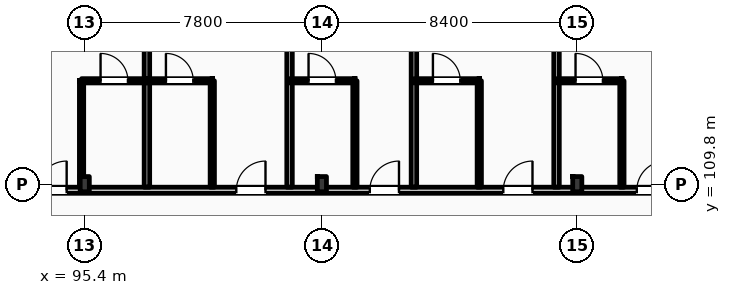
"""IFC4 building model, lengths in metres.
Left out: names, types, materials, properties, quantities, classifications, styles, units other than length and angle.
Written with IfcOpenShell. Run it as: python <this file> out.ifc"""

import sys

from ifc_helpers import new_model, si_unit, direction, frame, frame_2d, origin, origin_2d, place, context, subcontext, project, spatial, rectangle, i_section, extrude, element, fill, save


model = new_model("IFC4")
c1 = context("Model", 3, precision=1e-05, world=origin(), true_north=direction((0.0, 1.0)))
c2 = subcontext(c1, "Body", "Model", "MODEL_VIEW")
j1 = project(units=[si_unit("LENGTHUNIT", "METRE"), si_unit("PLANEANGLEUNIT", "RADIAN")], contexts=[c1])
p1 = place(None, origin())
s1 = spatial("IfcSite", under=j1, at=p1, CompositionType="ELEMENT")
p2 = place(p1, origin())
s2 = spatial("IfcBuilding", under=s1, at=p2, CompositionType="ELEMENT")
p3 = place(p2, frame((0.0, 0.0, 28.2)))
s3 = spatial("IfcBuildingStorey", under=s2, at=p3, CompositionType="ELEMENT", Elevation=28.2)
for number, where, z_axis, x_axis in (
    (1, (95.4, 109.8, 0.0), (0.0, 0.0, 1.0), (1.0, 0.0, 0.0)),
    (2, (103.2, 109.8, 0.0), (0.0, 0.0, 1.0), (1.0, 0.0, 0.0)),
    (3, (111.6, 109.8, 0.0), (0.0, 0.0, 1.0), (1.0, 0.0, 0.0)),
):
    element("IfcColumn", number, at=place(p3, frame(where, z_axis=z_axis, x_axis=x_axis)), inside=s3, PredefinedType="COLUMN", context=c2, shape_type="SweptSolid", body=[
        extrude(i_section(OverallWidth=0.3, OverallDepth=0.5, WebThickness=0.014, FlangeThickness=0.028, FilletRadius=0.027, at=origin_2d()), origin(), (0.0, 0.0, 1.0), 3.6),
    ])
p4 = place(p3, frame((10.65, 109.6, 0.0), z_axis=(0.0, 0.0, 1.0), x_axis=(1.0, 0.0, 0.0)))
e4 = element("IfcWall", 4, at=p4, inside=s3, PredefinedType="PARTITIONING", context=c2, shape_type="SweptSolid", body=[
    extrude(rectangle(XDim=109.21, YDim=0.2, at=frame_2d((54.605, 0.0))), origin(), (0.0, 0.0, 1.0), 2.8),
])
p5 = place(p4, frame((12.611, 0.0, 0.0)))
e5 = element("IfcOpeningElement", 5, at=p5, cuts=e4, PredefinedType="OPENING", context=c2, shape_type="SweptSolid", body=[
    extrude(rectangle(XDim=1.02, YDim=2.2, at=frame_2d((0.51, 1.1))), frame((0.0, 0.11, 0.0), z_axis=(0.0, -1.0, 0.0), x_axis=(1.0, 0.0, 0.0)), (0.0, 0.0, 1.0), 0.22),
])
p6 = place(p4, frame((19.451, 0.0, 0.0)))
e6 = element("IfcOpeningElement", 6, at=p6, cuts=e4, PredefinedType="OPENING", context=c2, shape_type="SweptSolid", body=[
    extrude(rectangle(XDim=1.02, YDim=2.2, at=frame_2d((0.51, 1.1))), frame((0.0, 0.11, 0.0), z_axis=(0.0, -1.0, 0.0), x_axis=(1.0, 0.0, 0.0)), (0.0, 0.0, 1.0), 0.22),
])
p7 = place(p4, frame((23.842, 0.0, 0.0)))
e7 = element("IfcOpeningElement", 7, at=p7, cuts=e4, PredefinedType="OPENING", context=c2, shape_type="SweptSolid", body=[
    extrude(rectangle(XDim=1.02, YDim=2.2, at=frame_2d((0.51, 1.1))), frame((0.0, 0.11, 0.0), z_axis=(0.0, -1.0, 0.0), x_axis=(1.0, 0.0, 0.0)), (0.0, 0.0, 1.0), 0.22),
])
p8 = place(p4, frame((26.084, 0.0, 0.0)))
e8 = element("IfcOpeningElement", 8, at=p8, cuts=e4, PredefinedType="OPENING", context=c2, shape_type="SweptSolid", body=[
    extrude(rectangle(XDim=1.02, YDim=2.2, at=frame_2d((0.51, 1.1))), frame((0.0, 0.11, 0.0), z_axis=(0.0, -1.0, 0.0), x_axis=(1.0, 0.0, 0.0)), (0.0, 0.0, 1.0), 0.22),
])
p9 = place(p4, frame((32.655, 0.0, 0.0)))
e9 = element("IfcOpeningElement", 9, at=p9, cuts=e4, PredefinedType="OPENING", context=c2, shape_type="SweptSolid", body=[
    extrude(rectangle(XDim=0.96, YDim=2.2, at=frame_2d((0.48, 1.1))), frame((0.0, 0.11, 0.0), z_axis=(0.0, -1.0, 0.0), x_axis=(1.0, 0.0, 0.0)), (0.0, 0.0, 1.0), 0.22),
])
p10 = place(p4, frame((34.895, 0.0, 0.0)))
e10 = element("IfcOpeningElement", 10, at=p10, cuts=e4, PredefinedType="OPENING", context=c2, shape_type="SweptSolid", body=[
    extrude(rectangle(XDim=0.96, YDim=2.2, at=frame_2d((0.48, 1.1))), frame((0.0, 0.11, 0.0), z_axis=(0.0, -1.0, 0.0), x_axis=(1.0, 0.0, 0.0)), (0.0, 0.0, 1.0), 0.22),
])
p11 = place(p4, frame((41.436, 0.0, 0.0)))
e11 = element("IfcOpeningElement", 11, at=p11, cuts=e4, PredefinedType="OPENING", context=c2, shape_type="SweptSolid", body=[
    extrude(rectangle(XDim=0.96, YDim=2.2, at=frame_2d((0.48, 1.1))), frame((0.0, 0.11, 0.0), z_axis=(0.0, -1.0, 0.0), x_axis=(1.0, 0.0, 0.0)), (0.0, 0.0, 1.0), 0.22),
])
p12 = place(p4, frame((43.427, 0.0, 0.0)))
e12 = element("IfcOpeningElement", 12, at=p12, cuts=e4, PredefinedType="OPENING", context=c2, shape_type="SweptSolid", body=[
    extrude(rectangle(XDim=0.96, YDim=2.2, at=frame_2d((0.48, 1.1))), frame((0.0, 0.11, 0.0), z_axis=(0.0, -1.0, 0.0), x_axis=(1.0, 0.0, 0.0)), (0.0, 0.0, 1.0), 0.22),
])
p13 = place(p4, frame((50.218, 0.0, 0.0)))
e13 = element("IfcOpeningElement", 13, at=p13, cuts=e4, PredefinedType="OPENING", context=c2, shape_type="SweptSolid", body=[
    extrude(rectangle(XDim=0.96, YDim=2.2, at=frame_2d((0.48, 1.1))), frame((0.0, 0.11, 0.0), z_axis=(0.0, -1.0, 0.0), x_axis=(1.0, 0.0, 0.0)), (0.0, 0.0, 1.0), 0.22),
])
p14 = place(p4, frame((54.859, 0.0, 0.0)))
e14 = element("IfcOpeningElement", 14, at=p14, cuts=e4, PredefinedType="OPENING", context=c2, shape_type="SweptSolid", body=[
    extrude(rectangle(XDim=0.96, YDim=2.2, at=frame_2d((0.48, 1.1))), frame((0.0, 0.11, 0.0), z_axis=(0.0, -1.0, 0.0), x_axis=(1.0, 0.0, 0.0)), (0.0, 0.0, 1.0), 0.22),
])
p15 = place(p4, frame((59.0, 0.0, 0.0)))
e15 = element("IfcOpeningElement", 15, at=p15, cuts=e4, PredefinedType="OPENING", context=c2, shape_type="SweptSolid", body=[
    extrude(rectangle(XDim=0.96, YDim=2.2, at=frame_2d((0.48, 1.1))), frame((0.0, 0.11, 0.0), z_axis=(0.0, -1.0, 0.0), x_axis=(1.0, 0.0, 0.0)), (0.0, 0.0, 1.0), 0.22),
])
p16 = place(p4, frame((63.39, 0.0, 0.0)))
e16 = element("IfcOpeningElement", 16, at=p16, cuts=e4, PredefinedType="OPENING", context=c2, shape_type="SweptSolid", body=[
    extrude(rectangle(XDim=0.96, YDim=2.2, at=frame_2d((0.48, 1.1))), frame((0.0, 0.11, 0.0), z_axis=(0.0, -1.0, 0.0), x_axis=(1.0, 0.0, 0.0)), (0.0, 0.0, 1.0), 0.22),
])
p17 = place(p4, frame((65.631, 0.0, 0.0)))
e17 = element("IfcOpeningElement", 17, at=p17, cuts=e4, PredefinedType="OPENING", context=c2, shape_type="SweptSolid", body=[
    extrude(rectangle(XDim=0.96, YDim=2.2, at=frame_2d((0.48, 1.1))), frame((0.0, 0.11, 0.0), z_axis=(0.0, -1.0, 0.0), x_axis=(1.0, 0.0, 0.0)), (0.0, 0.0, 1.0), 0.22),
])
p18 = place(p4, frame((72.172, 0.0, 0.0)))
e18 = element("IfcOpeningElement", 18, at=p18, cuts=e4, PredefinedType="OPENING", context=c2, shape_type="SweptSolid", body=[
    extrude(rectangle(XDim=0.96, YDim=2.2, at=frame_2d((0.48, 1.1))), frame((0.0, 0.11, 0.0), z_axis=(0.0, -1.0, 0.0), x_axis=(1.0, 0.0, 0.0)), (0.0, 0.0, 1.0), 0.22),
])
p19 = place(p4, frame((74.413, 0.0, 0.0)))
e19 = element("IfcOpeningElement", 19, at=p19, cuts=e4, PredefinedType="OPENING", context=c2, shape_type="SweptSolid", body=[
    extrude(rectangle(XDim=0.96, YDim=2.2, at=frame_2d((0.48, 1.1))), frame((0.0, 0.11, 0.0), z_axis=(0.0, -1.0, 0.0), x_axis=(1.0, 0.0, 0.0)), (0.0, 0.0, 1.0), 0.22),
])
p20 = place(p4, frame((80.954, 0.0, 0.0)))
e20 = element("IfcOpeningElement", 20, at=p20, cuts=e4, PredefinedType="OPENING", context=c2, shape_type="SweptSolid", body=[
    extrude(rectangle(XDim=0.96, YDim=2.2, at=frame_2d((0.48, 1.1))), frame((0.0, 0.11, 0.0), z_axis=(0.0, -1.0, 0.0), x_axis=(1.0, 0.0, 0.0)), (0.0, 0.0, 1.0), 0.22),
])
p21 = place(p4, frame((83.195, 0.0, 0.0)))
e21 = element("IfcOpeningElement", 21, at=p21, cuts=e4, PredefinedType="OPENING", context=c2, shape_type="SweptSolid", body=[
    extrude(rectangle(XDim=0.96, YDim=2.2, at=frame_2d((0.48, 1.1))), frame((0.0, 0.11, 0.0), z_axis=(0.0, -1.0, 0.0), x_axis=(1.0, 0.0, 0.0)), (0.0, 0.0, 1.0), 0.22),
])
p22 = place(p4, frame((89.735, 0.0, 0.0)))
e22 = element("IfcOpeningElement", 22, at=p22, cuts=e4, PredefinedType="OPENING", context=c2, shape_type="SweptSolid", body=[
    extrude(rectangle(XDim=0.96, YDim=2.2, at=frame_2d((0.48, 1.1))), frame((0.0, 0.11, 0.0), z_axis=(0.0, -1.0, 0.0), x_axis=(1.0, 0.0, 0.0)), (0.0, 0.0, 1.0), 0.22),
])
p23 = place(p4, frame((94.126, 0.0, 0.0)))
e23 = element("IfcOpeningElement", 23, at=p23, cuts=e4, PredefinedType="OPENING", context=c2, shape_type="SweptSolid", body=[
    extrude(rectangle(XDim=0.96, YDim=2.2, at=frame_2d((0.48, 1.1))), frame((0.0, 0.11, 0.0), z_axis=(0.0, -1.0, 0.0), x_axis=(1.0, 0.0, 0.0)), (0.0, 0.0, 1.0), 0.22),
])
p24 = place(p4, frame((98.517, 0.0, 0.0)))
e24 = element("IfcOpeningElement", 24, at=p24, cuts=e4, PredefinedType="OPENING", context=c2, shape_type="SweptSolid", body=[
    extrude(rectangle(XDim=0.96, YDim=2.2, at=frame_2d((0.48, 1.1))), frame((0.0, 0.11, 0.0), z_axis=(0.0, -1.0, 0.0), x_axis=(1.0, 0.0, 0.0)), (0.0, 0.0, 1.0), 0.22),
])
p25 = place(p4, frame((102.908, 0.0, 0.0)))
e25 = element("IfcOpeningElement", 25, at=p25, cuts=e4, PredefinedType="OPENING", context=c2, shape_type="SweptSolid", body=[
    extrude(rectangle(XDim=0.96, YDim=2.2, at=frame_2d((0.48, 1.1))), frame((0.0, 0.11, 0.0), z_axis=(0.0, -1.0, 0.0), x_axis=(1.0, 0.0, 0.0)), (0.0, 0.0, 1.0), 0.22),
])
p26 = place(p4, frame((105.099, 0.0, 0.0)))
e26 = element("IfcOpeningElement", 26, at=p26, cuts=e4, PredefinedType="OPENING", context=c2, shape_type="SweptSolid", body=[
    extrude(rectangle(XDim=0.96, YDim=2.2, at=frame_2d((0.48, 1.1))), frame((0.0, 0.11, 0.0), z_axis=(0.0, -1.0, 0.0), x_axis=(1.0, 0.0, 0.0)), (0.0, 0.0, 1.0), 0.22),
])
p27 = place(p4, frame((2.716, 0.0, 0.0)))
e27 = element("IfcOpeningElement", 27, at=p27, cuts=e4, PredefinedType="OPENING", context=c2, shape_type="SweptSolid", body=[
    extrude(rectangle(XDim=1.35, YDim=2.25, at=frame_2d((0.675, 1.125))), frame((0.0, 0.11, 0.0), z_axis=(0.0, -1.0, 0.0), x_axis=(1.0, 0.0, 0.0)), (0.0, 0.0, 1.0), 0.22),
])
p28 = place(p4, frame((6.65, 0.0, 0.0)))
e28 = element("IfcOpeningElement", 28, at=p28, cuts=e4, PredefinedType="OPENING", context=c2, shape_type="SweptSolid", body=[
    extrude(rectangle(XDim=1.35, YDim=2.25, at=frame_2d((0.675, 1.125))), frame((0.0, 0.11, 0.0), z_axis=(0.0, -1.0, 0.0), x_axis=(1.0, 0.0, 0.0)), (0.0, 0.0, 1.0), 0.22),
])
p29 = place(p4, frame((10.583, 0.0, 0.0)))
e29 = element("IfcOpeningElement", 29, at=p29, cuts=e4, PredefinedType="OPENING", context=c2, shape_type="SweptSolid", body=[
    extrude(rectangle(XDim=1.35, YDim=2.25, at=frame_2d((0.675, 1.125))), frame((0.0, 0.11, 0.0), z_axis=(0.0, -1.0, 0.0), x_axis=(1.0, 0.0, 0.0)), (0.0, 0.0, 1.0), 0.22),
])
p30 = place(p3, frame((97.445, 109.7, 0.0), z_axis=(0.0, 0.0, 1.0), x_axis=(0.0, 1.0, 0.0)))
e30 = element("IfcWall", 30, at=p30, inside=s3, PredefinedType="PARTITIONING", context=c2, shape_type="SweptSolid", body=[
    extrude(rectangle(XDim=8.15, YDim=0.18, at=frame_2d((4.075, 0.0))), origin(), (0.0, 0.0, 1.0), 3.36),
])
p31 = place(p3, frame((95.295, 109.7, 0.0), z_axis=(0.0, 0.0, 1.0), x_axis=(0.0, 1.0, 0.0)))
e31 = element("IfcWall", 31, at=p31, inside=s3, PredefinedType="PARTITIONING", context=c2, shape_type="SweptSolid", body=[
    extrude(rectangle(XDim=3.5, YDim=0.14, at=frame_2d((1.75, 0.0))), origin(), (0.0, 0.0, 1.0), 2.99),
])
p32 = place(p3, frame((95.295, 113.2, 0.0), z_axis=(0.0, 0.0, 1.0), x_axis=(1.0, 0.0, 0.0)))
e32 = element("IfcWall", 32, at=p32, inside=s3, PredefinedType="PARTITIONING", context=c2, shape_type="SweptSolid", body=[
    extrude(rectangle(XDim=2.15, YDim=0.14, at=frame_2d((1.075, 0.0))), origin(), (0.0, 0.0, 1.0), 3.36),
])
p33 = place(p32, frame((0.625, 0.0, 0.0)))
e33 = element("IfcOpeningElement", 33, at=p33, cuts=e32, PredefinedType="OPENING", context=c2, shape_type="SweptSolid", body=[
    extrude(rectangle(XDim=0.9, YDim=2.1, at=frame_2d((0.45, 1.05))), frame((0.0, 0.08, 0.0), z_axis=(0.0, -1.0, 0.0), x_axis=(1.0, 0.0, 0.0)), (0.0, 0.0, 1.0), 0.16),
])
p34 = place(p3, frame((102.136, 109.7, 0.0), z_axis=(0.0, 0.0, 1.0), x_axis=(0.0, 1.0, 0.0)))
e34 = element("IfcWall", 34, at=p34, inside=s3, PredefinedType="PARTITIONING", context=c2, shape_type="SweptSolid", body=[
    extrude(rectangle(XDim=8.15, YDim=0.18, at=frame_2d((4.075, 0.0))), origin(), (0.0, 0.0, 1.0), 3.36),
])
p35 = place(p3, frame((99.595, 109.7, 0.0), z_axis=(0.0, 0.0, 1.0), x_axis=(0.0, 1.0, 0.0)))
e35 = element("IfcWall", 35, at=p35, inside=s3, PredefinedType="PARTITIONING", context=c2, shape_type="SweptSolid", body=[
    extrude(rectangle(XDim=3.5, YDim=0.14, at=frame_2d((1.75, 0.0))), origin(), (0.0, 0.0, 1.0), 3.36),
])
p36 = place(p3, frame((97.445, 113.2, 0.0), z_axis=(0.0, 0.0, 1.0), x_axis=(1.0, 0.0, 0.0)))
e36 = element("IfcWall", 36, at=p36, inside=s3, PredefinedType="PARTITIONING", context=c2, shape_type="SweptSolid", body=[
    extrude(rectangle(XDim=2.15, YDim=0.14, at=frame_2d((1.075, 0.0))), origin(), (0.0, 0.0, 1.0), 3.36),
])
p37 = place(p36, frame((0.625, 0.0, 0.0)))
e37 = element("IfcOpeningElement", 37, at=p37, cuts=e36, PredefinedType="OPENING", context=c2, shape_type="SweptSolid", body=[
    extrude(rectangle(XDim=0.9, YDim=2.1, at=frame_2d((0.45, 1.05))), frame((0.0, 0.08, 0.0), z_axis=(0.0, -1.0, 0.0), x_axis=(1.0, 0.0, 0.0)), (0.0, 0.0, 1.0), 0.16),
])
p38 = place(p3, frame((106.227, 109.7, 0.0), z_axis=(0.0, 0.0, 1.0), x_axis=(0.0, 1.0, 0.0)))
e38 = element("IfcWall", 38, at=p38, inside=s3, PredefinedType="PARTITIONING", context=c2, shape_type="SweptSolid", body=[
    extrude(rectangle(XDim=8.15, YDim=0.18, at=frame_2d((4.075, 0.0))), origin(), (0.0, 0.0, 1.0), 3.05),
])
p39 = place(p3, frame((104.286, 109.7, 0.0), z_axis=(0.0, 0.0, 1.0), x_axis=(0.0, 1.0, 0.0)))
e39 = element("IfcWall", 39, at=p39, inside=s3, PredefinedType="PARTITIONING", context=c2, shape_type="SweptSolid", body=[
    extrude(rectangle(XDim=3.5, YDim=0.14, at=frame_2d((1.75, 0.0))), origin(), (0.0, 0.0, 1.0), 3.36),
])
p40 = place(p3, frame((102.136, 113.2, 0.0), z_axis=(0.0, 0.0, 1.0), x_axis=(1.0, 0.0, 0.0)))
e40 = element("IfcWall", 40, at=p40, inside=s3, PredefinedType="PARTITIONING", context=c2, shape_type="SweptSolid", body=[
    extrude(rectangle(XDim=2.15, YDim=0.14, at=frame_2d((1.075, 0.0))), origin(), (0.0, 0.0, 1.0), 3.36),
])
p41 = place(p40, frame((0.625, 0.0, 0.0)))
e41 = element("IfcOpeningElement", 41, at=p41, cuts=e40, PredefinedType="OPENING", context=c2, shape_type="SweptSolid", body=[
    extrude(rectangle(XDim=0.9, YDim=2.1, at=frame_2d((0.45, 1.05))), frame((0.0, 0.08, 0.0), z_axis=(0.0, -1.0, 0.0), x_axis=(1.0, 0.0, 0.0)), (0.0, 0.0, 1.0), 0.16),
])
p42 = place(p3, frame((110.918, 109.7, 0.0), z_axis=(0.0, 0.0, 1.0), x_axis=(0.0, 1.0, 0.0)))
e42 = element("IfcWall", 42, at=p42, inside=s3, PredefinedType="PARTITIONING", context=c2, shape_type="SweptSolid", body=[
    extrude(rectangle(XDim=8.15, YDim=0.18, at=frame_2d((4.075, 0.0))), origin(), (0.0, 0.0, 1.0), 3.36),
])
p43 = place(p3, frame((108.377, 109.7, 0.0), z_axis=(0.0, 0.0, 1.0), x_axis=(0.0, 1.0, 0.0)))
e43 = element("IfcWall", 43, at=p43, inside=s3, PredefinedType="PARTITIONING", context=c2, shape_type="SweptSolid", body=[
    extrude(rectangle(XDim=3.5, YDim=0.14, at=frame_2d((1.75, 0.0))), origin(), (0.0, 0.0, 1.0), 3.36),
])
p44 = place(p3, frame((106.227, 113.2, 0.0), z_axis=(0.0, 0.0, 1.0), x_axis=(1.0, 0.0, 0.0)))
e44 = element("IfcWall", 44, at=p44, inside=s3, PredefinedType="PARTITIONING", context=c2, shape_type="SweptSolid", body=[
    extrude(rectangle(XDim=2.15, YDim=0.14, at=frame_2d((1.075, 0.0))), origin(), (0.0, 0.0, 1.0), 3.36),
])
p45 = place(p44, frame((0.625, 0.0, 0.0)))
e45 = element("IfcOpeningElement", 45, at=p45, cuts=e44, PredefinedType="OPENING", context=c2, shape_type="SweptSolid", body=[
    extrude(rectangle(XDim=0.9, YDim=2.1, at=frame_2d((0.45, 1.05))), frame((0.0, 0.08, 0.0), z_axis=(0.0, -1.0, 0.0), x_axis=(1.0, 0.0, 0.0)), (0.0, 0.0, 1.0), 0.16),
])
p46 = place(p3, frame((113.068, 109.7, 0.0), z_axis=(0.0, 0.0, 1.0), x_axis=(0.0, 1.0, 0.0)))
e46 = element("IfcWall", 46, at=p46, inside=s3, PredefinedType="PARTITIONING", context=c2, shape_type="SweptSolid", body=[
    extrude(rectangle(XDim=3.5, YDim=0.14, at=frame_2d((1.75, 0.0))), origin(), (0.0, 0.0, 1.0), 3.36),
])
p47 = place(p3, frame((110.918, 113.2, 0.0), z_axis=(0.0, 0.0, 1.0), x_axis=(1.0, 0.0, 0.0)))
e47 = element("IfcWall", 47, at=p47, inside=s3, PredefinedType="PARTITIONING", context=c2, shape_type="SweptSolid", body=[
    extrude(rectangle(XDim=2.15, YDim=0.14, at=frame_2d((1.075, 0.0))), origin(), (0.0, 0.0, 1.0), 3.36),
])
p48 = place(p47, frame((0.625, 0.0, 0.0)))
e48 = element("IfcOpeningElement", 48, at=p48, cuts=e47, PredefinedType="OPENING", context=c2, shape_type="SweptSolid", body=[
    extrude(rectangle(XDim=0.9, YDim=2.1, at=frame_2d((0.45, 1.05))), frame((0.0, 0.08, 0.0), z_axis=(0.0, -1.0, 0.0), x_axis=(1.0, 0.0, 0.0)), (0.0, 0.0, 1.0), 0.16),
])
p49 = place(p21, origin())
e49 = element("IfcDoor", 49, at=p49, inside=s3, OperationType="SINGLE_SWING_RIGHT", PredefinedType="DOOR", context=c2, shape_type="SweptSolid", body=[
    extrude(rectangle(XDim=0.96, YDim=2.2, at=frame_2d((0.48, 1.1))), frame((0.0, 0.025, 0.0), z_axis=(0.0, -1.0, 0.0), x_axis=(1.0, 0.0, 0.0)), (0.0, 0.0, 1.0), 0.05),
])
fill(e21, e49)
p50 = place(p33, origin())
e50 = element("IfcDoor", 50, at=p50, inside=s3, OperationType="SINGLE_SWING_LEFT", PredefinedType="DOOR", context=c2, shape_type="SweptSolid", body=[
    extrude(rectangle(XDim=0.9, YDim=2.1, at=frame_2d((0.45, 1.05))), frame((0.0, 0.025, 0.0), z_axis=(0.0, -1.0, 0.0), x_axis=(1.0, 0.0, 0.0)), (0.0, 0.0, 1.0), 0.05),
])
fill(e33, e50)
p51 = place(p22, origin())
e51 = element("IfcDoor", 51, at=p51, inside=s3, OperationType="SINGLE_SWING_RIGHT", PredefinedType="DOOR", context=c2, shape_type="SweptSolid", body=[
    extrude(rectangle(XDim=0.96, YDim=2.2, at=frame_2d((0.48, 1.1))), frame((0.0, 0.025, 0.0), z_axis=(0.0, -1.0, 0.0), x_axis=(1.0, 0.0, 0.0)), (0.0, 0.0, 1.0), 0.05),
])
fill(e22, e51)
p52 = place(p37, origin())
e52 = element("IfcDoor", 52, at=p52, inside=s3, OperationType="SINGLE_SWING_LEFT", PredefinedType="DOOR", context=c2, shape_type="SweptSolid", body=[
    extrude(rectangle(XDim=0.9, YDim=2.1, at=frame_2d((0.45, 1.05))), frame((0.0, 0.025, 0.0), z_axis=(0.0, -1.0, 0.0), x_axis=(1.0, 0.0, 0.0)), (0.0, 0.0, 1.0), 0.05),
])
fill(e37, e52)
p53 = place(p23, origin())
e53 = element("IfcDoor", 53, at=p53, inside=s3, OperationType="SINGLE_SWING_RIGHT", PredefinedType="DOOR", context=c2, shape_type="SweptSolid", body=[
    extrude(rectangle(XDim=0.96, YDim=2.2, at=frame_2d((0.48, 1.1))), frame((0.0, 0.025, 0.0), z_axis=(0.0, -1.0, 0.0), x_axis=(1.0, 0.0, 0.0)), (0.0, 0.0, 1.0), 0.05),
])
fill(e23, e53)
p54 = place(p41, origin())
e54 = element("IfcDoor", 54, at=p54, inside=s3, OperationType="SINGLE_SWING_LEFT", PredefinedType="DOOR", context=c2, shape_type="SweptSolid", body=[
    extrude(rectangle(XDim=0.9, YDim=2.1, at=frame_2d((0.45, 1.05))), frame((0.0, 0.025, 0.0), z_axis=(0.0, -1.0, 0.0), x_axis=(1.0, 0.0, 0.0)), (0.0, 0.0, 1.0), 0.05),
])
fill(e41, e54)
p55 = place(p24, origin())
e55 = element("IfcDoor", 55, at=p55, inside=s3, OperationType="SINGLE_SWING_RIGHT", PredefinedType="DOOR", context=c2, shape_type="SweptSolid", body=[
    extrude(rectangle(XDim=0.96, YDim=2.2, at=frame_2d((0.48, 1.1))), frame((0.0, 0.025, 0.0), z_axis=(0.0, -1.0, 0.0), x_axis=(1.0, 0.0, 0.0)), (0.0, 0.0, 1.0), 0.05),
])
fill(e24, e55)
p56 = place(p45, origin())
e56 = element("IfcDoor", 56, at=p56, inside=s3, OperationType="SINGLE_SWING_LEFT", PredefinedType="DOOR", context=c2, shape_type="SweptSolid", body=[
    extrude(rectangle(XDim=0.9, YDim=2.1, at=frame_2d((0.45, 1.05))), frame((0.0, 0.025, 0.0), z_axis=(0.0, -1.0, 0.0), x_axis=(1.0, 0.0, 0.0)), (0.0, 0.0, 1.0), 0.05),
])
fill(e45, e56)
p57 = place(p25, origin())
e57 = element("IfcDoor", 57, at=p57, inside=s3, OperationType="SINGLE_SWING_RIGHT", PredefinedType="DOOR", context=c2, shape_type="SweptSolid", body=[
    extrude(rectangle(XDim=0.96, YDim=2.2, at=frame_2d((0.48, 1.1))), frame((0.0, 0.025, 0.0), z_axis=(0.0, -1.0, 0.0), x_axis=(1.0, 0.0, 0.0)), (0.0, 0.0, 1.0), 0.05),
])
fill(e25, e57)
p58 = place(p48, origin())
e58 = element("IfcDoor", 58, at=p58, inside=s3, OperationType="SINGLE_SWING_LEFT", PredefinedType="DOOR", context=c2, shape_type="SweptSolid", body=[
    extrude(rectangle(XDim=0.9, YDim=2.1, at=frame_2d((0.45, 1.05))), frame((0.0, 0.025, 0.0), z_axis=(0.0, -1.0, 0.0), x_axis=(1.0, 0.0, 0.0)), (0.0, 0.0, 1.0), 0.05),
])
fill(e48, e58)
save(model, sys.argv[1])
